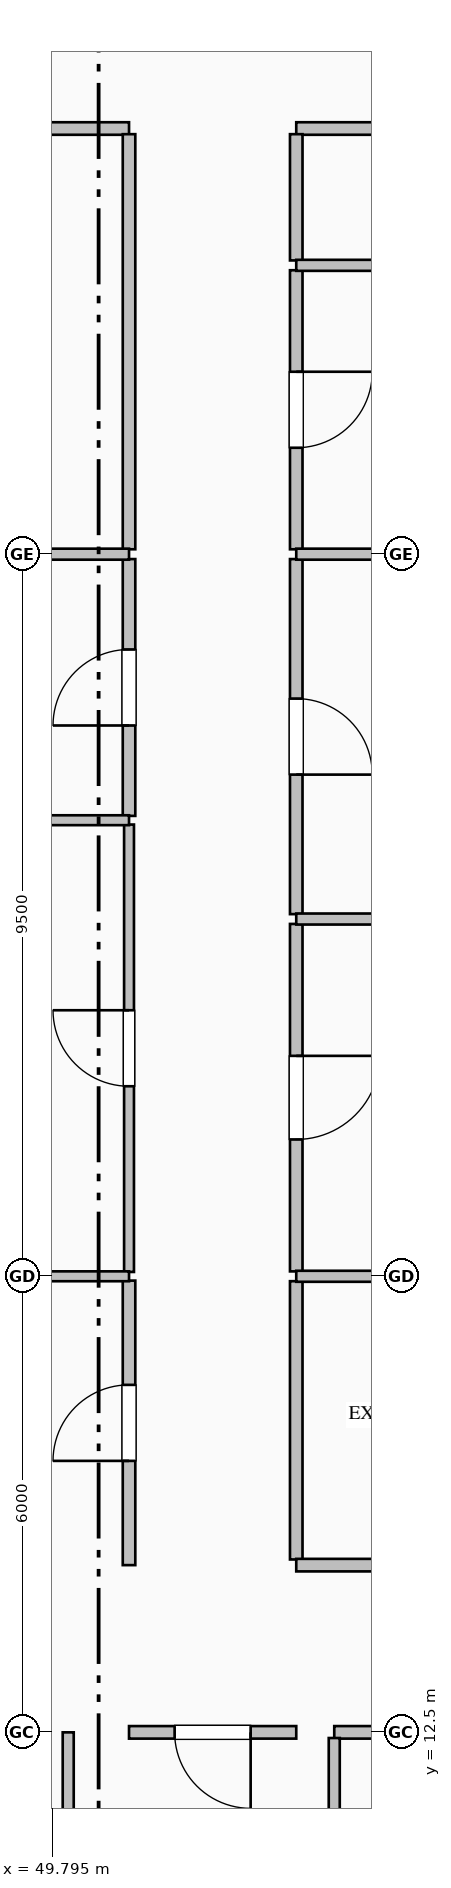
"""IFC4 building model, lengths in metres.
Left out: names, types, materials, properties, quantities, classifications, styles, units other than length and angle.
Written with IfcOpenShell. Run it as: python <this file> out.ifc"""

import sys

from ifc_helpers import new_model, si_unit, direction, frame, frame_2d, origin, place, context, subcontext, project, spatial, rectangle, extrude, element, fill, save


model = new_model("IFC4")
c1 = context("Model", 3, precision=1e-05, world=origin(), true_north=direction((0.0, 1.0)))
c2 = subcontext(c1, "Body", "Model", "MODEL_VIEW")
j1 = project(units=[si_unit("LENGTHUNIT", "METRE"), si_unit("PLANEANGLEUNIT", "RADIAN")], contexts=[c1])
p1 = place(None, origin())
s1 = spatial("IfcSite", under=j1, at=p1, CompositionType="ELEMENT")
p2 = place(p1, origin())
s2 = spatial("IfcBuilding", under=s1, at=p2, CompositionType="ELEMENT")
p3 = place(p2, frame((0.0, 0.0, 127.0)))
s3 = spatial("IfcBuildingStorey", under=s2, at=p3, CompositionType="ELEMENT", Elevation=127.0)
p4 = place(p3, frame((56.5, 33.6, 0.0), z_axis=(0.0, 0.0, 1.0), x_axis=(-1.0, 0.0, 0.0)))
e1 = element("IfcWall", 1, at=p4, inside=s3, PredefinedType="PARTITIONING", context=c2, shape_type="SweptSolid", body=[
    extrude(rectangle(XDim=3.5, YDim=0.165, at=frame_2d((1.75, 0.0))), origin(), (0.0, 0.0, 1.0), 3.765),
])
p5 = place(p4, frame((1.2, 0.0, 0.0)))
e2 = element("IfcOpeningElement", 2, at=p5, cuts=e1, PredefinedType="OPENING", context=c2, shape_type="SweptSolid", body=[
    extrude(rectangle(XDim=1.1, YDim=2.2, at=frame_2d((0.55, 1.1))), frame((0.0, 0.093, 0.0), z_axis=(0.0, -1.0, 0.0), x_axis=(1.0, 0.0, 0.0)), (0.0, 0.0, 1.0), 0.185),
])
p6 = place(p3, frame((50.8, 33.6, 0.0), z_axis=(0.0, 0.0, 1.0), x_axis=(-1.0, 0.0, 0.0)))
e3 = element("IfcWall", 3, at=p6, inside=s3, PredefinedType="PARTITIONING", context=c2, shape_type="SweptSolid", body=[
    extrude(rectangle(XDim=10.3, YDim=0.165, at=frame_2d((5.15, 0.0))), origin(), (0.0, 0.0, 1.0), 3.765),
])
p7 = place(p6, frame((4.65, 0.0, 0.0)))
e4 = element("IfcOpeningElement", 4, at=p7, cuts=e3, PredefinedType="OPENING", context=c2, shape_type="SweptSolid", body=[
    extrude(rectangle(XDim=1.0, YDim=2.15, at=frame_2d((0.5, 1.075))), frame((0.0, 0.093, 0.0), z_axis=(0.0, -1.0, 0.0), x_axis=(1.0, 0.0, 0.0)), (0.0, 0.0, 1.0), 0.185),
])
p8 = place(p3, frame((53.0, 18.436, 0.0), z_axis=(0.0, 0.0, 1.0), x_axis=(0.0, -1.0, 0.0)))
e5 = element("IfcWall", 5, at=p8, inside=s3, PredefinedType="PARTITIONING", context=c2, shape_type="SweptSolid", body=[
    extrude(rectangle(XDim=3.661, YDim=0.165, at=frame_2d((1.831, 0.0))), origin(), (0.0, 0.0, 1.0), 3.765),
])
p9 = place(p3, frame((53.0, 23.135, 0.0), z_axis=(0.0, 0.0, 1.0), x_axis=(0.0, -1.0, 0.0)))
e6 = element("IfcWall", 6, at=p9, inside=s3, PredefinedType="PARTITIONING", context=c2, shape_type="SweptSolid", body=[
    extrude(rectangle(XDim=4.571, YDim=0.165, at=frame_2d((2.286, 0.0))), origin(), (0.0, 0.0, 1.0), 3.765),
])
p10 = place(p9, frame((1.736, 0.0, 0.0)))
e7 = element("IfcOpeningElement", 7, at=p10, cuts=e6, PredefinedType="OPENING", context=c2, shape_type="SweptSolid", body=[
    extrude(rectangle(XDim=1.1, YDim=2.2, at=frame_2d((0.55, 1.1))), frame((0.0, 0.093, 0.0), z_axis=(0.0, -1.0, 0.0), x_axis=(1.0, 0.0, 0.0)), (0.0, 0.0, 1.0), 0.185),
])
p11 = place(p3, frame((53.0, 27.936, 0.0), z_axis=(0.0, 0.0, 1.0), x_axis=(0.0, -1.0, 0.0)))
e8 = element("IfcWall", 8, at=p11, inside=s3, PredefinedType="PARTITIONING", context=c2, shape_type="SweptSolid", body=[
    extrude(rectangle(XDim=4.671, YDim=0.165, at=frame_2d((2.335, 0.0))), origin(), (0.0, 0.0, 1.0), 3.765),
])
p12 = place(p11, frame((1.835, 0.0, 0.0)))
e9 = element("IfcOpeningElement", 9, at=p12, cuts=e8, PredefinedType="OPENING", context=c2, shape_type="SweptSolid", body=[
    extrude(rectangle(XDim=1.0, YDim=2.15, at=frame_2d((0.5, 1.075))), frame((0.0, 0.093, 0.0), z_axis=(0.0, -1.0, 0.0), x_axis=(1.0, 0.0, 0.0)), (0.0, 0.0, 1.0), 0.185),
])
p13 = place(p3, frame((53.0, 31.736, 0.0), z_axis=(0.0, 0.0, 1.0), x_axis=(0.0, -1.0, 0.0)))
e10 = element("IfcWall", 10, at=p13, inside=s3, PredefinedType="PARTITIONING", context=c2, shape_type="SweptSolid", body=[
    extrude(rectangle(XDim=3.671, YDim=0.165, at=frame_2d((1.835, 0.0))), origin(), (0.0, 0.0, 1.0), 3.765),
])
p14 = place(p13, frame((1.335, 0.0, 0.0)))
e11 = element("IfcOpeningElement", 11, at=p14, cuts=e10, PredefinedType="OPENING", context=c2, shape_type="SweptSolid", body=[
    extrude(rectangle(XDim=1.0, YDim=2.15, at=frame_2d((0.5, 1.075))), frame((0.0, 0.093, 0.0), z_axis=(0.0, -1.0, 0.0), x_axis=(1.0, 0.0, 0.0)), (0.0, 0.0, 1.0), 0.185),
])
p15 = place(p3, frame((53.0, 33.525, 0.0), z_axis=(0.0, 0.0, 1.0), x_axis=(0.0, -1.0, 0.0)))
e12 = element("IfcWall", 12, at=p15, inside=s3, PredefinedType="PARTITIONING", context=c2, shape_type="SweptSolid", body=[
    extrude(rectangle(XDim=1.661, YDim=0.165, at=frame_2d((0.831, 0.0))), origin(), (0.0, 0.0, 1.0), 3.765),
])
p16 = place(p3, frame((50.8, 14.7, 0.0), z_axis=(0.0, 0.0, 1.0), x_axis=(0.0, 1.0, 0.0)))
e13 = element("IfcWall", 13, at=p16, inside=s3, PredefinedType="PARTITIONING", context=c2, shape_type="SweptSolid", body=[
    extrude(rectangle(XDim=3.743, YDim=0.165, at=frame_2d((1.872, 0.0))), origin(), (0.0, 0.0, 1.0), 3.765),
])
p17 = place(p16, frame((1.372, 0.0, 0.0)))
e14 = element("IfcOpeningElement", 14, at=p17, cuts=e13, PredefinedType="OPENING", context=c2, shape_type="SweptSolid", body=[
    extrude(rectangle(XDim=1.0, YDim=2.15, at=frame_2d((0.5, 1.075))), frame((0.0, 0.093, 0.0), z_axis=(0.0, -1.0, 0.0), x_axis=(1.0, 0.0, 0.0)), (0.0, 0.0, 1.0), 0.185),
])
p18 = place(p3, frame((50.8, 18.557, 0.0), z_axis=(0.0, 0.0, 1.0), x_axis=(0.0, 1.0, 0.0)))
e15 = element("IfcWall", 15, at=p18, inside=s3, PredefinedType="PARTITIONING", context=c2, shape_type="SweptSolid", body=[
    extrude(rectangle(XDim=5.886, YDim=0.13, at=frame_2d((2.943, 0.0))), origin(), (0.0, 0.0, 1.0), 3.765),
])
p19 = place(p18, frame((2.443, 0.0, 0.0)))
e16 = element("IfcOpeningElement", 16, at=p19, cuts=e15, PredefinedType="OPENING", context=c2, shape_type="SweptSolid", body=[
    extrude(rectangle(XDim=1.0, YDim=2.15, at=frame_2d((0.5, 1.075))), frame((0.0, 0.075, 0.0), z_axis=(0.0, -1.0, 0.0), x_axis=(1.0, 0.0, 0.0)), (0.0, 0.0, 1.0), 0.15),
])
p20 = place(p3, frame((50.8, 24.557, 0.0), z_axis=(0.0, 0.0, 1.0), x_axis=(0.0, 1.0, 0.0)))
e17 = element("IfcWall", 17, at=p20, inside=s3, PredefinedType="PARTITIONING", context=c2, shape_type="SweptSolid", body=[
    extrude(rectangle(XDim=3.379, YDim=0.165, at=frame_2d((1.689, 0.0))), origin(), (0.0, 0.0, 1.0), 3.765),
])
p21 = place(p20, frame((1.189, 0.0, 0.0)))
e18 = element("IfcOpeningElement", 18, at=p21, cuts=e17, PredefinedType="OPENING", context=c2, shape_type="SweptSolid", body=[
    extrude(rectangle(XDim=1.0, YDim=2.15, at=frame_2d((0.5, 1.075))), frame((0.0, 0.093, 0.0), z_axis=(0.0, -1.0, 0.0), x_axis=(1.0, 0.0, 0.0)), (0.0, 0.0, 1.0), 0.185),
])
p22 = place(p3, frame((50.8, 28.064, 0.0), z_axis=(0.0, 0.0, 1.0), x_axis=(0.0, 1.0, 0.0)))
e19 = element("IfcWall", 19, at=p22, inside=s3, PredefinedType="PARTITIONING", context=c2, shape_type="SweptSolid", body=[
    extrude(rectangle(XDim=5.461, YDim=0.165, at=frame_2d((2.73, 0.0))), origin(), (0.0, 0.0, 1.0), 3.765),
])
p23 = place(p3, frame((53.0, 12.5, 0.0), z_axis=(0.0, 0.0, 1.0), x_axis=(-1.0, 0.0, 0.0)))
e20 = element("IfcWall", 20, at=p23, inside=s3, PredefinedType="PARTITIONING", context=c2, shape_type="SweptSolid", body=[
    extrude(rectangle(XDim=2.2, YDim=0.165, at=frame_2d((1.1, 0.0))), origin(), (0.0, 0.0, 1.0), 3.157),
])
p24 = place(p23, frame((0.6, 0.0, 0.0)))
e21 = element("IfcOpeningElement", 21, at=p24, cuts=e20, PredefinedType="OPENING", context=c2, shape_type="SweptSolid", body=[
    extrude(rectangle(XDim=1.0, YDim=2.15, at=frame_2d((0.5, 1.075))), frame((0.0, 0.093, 0.0), z_axis=(0.0, -1.0, 0.0), x_axis=(1.0, 0.0, 0.0)), (0.0, 0.0, 1.0), 0.185),
])
p25 = place(p3, frame((53.0, 14.7, 0.0), z_axis=(0.0, 0.0, 1.0), x_axis=(1.0, 0.0, 0.0)))
e22 = element("IfcWall", 22, at=p25, inside=s3, PredefinedType="PARTITIONING", context=c2, shape_type="SweptSolid", body=[
    extrude(rectangle(XDim=8.5, YDim=0.165, at=frame_2d((4.25, 0.0))), origin(), (0.0, 0.0, 1.0), 3.765),
])
p26 = place(p25, frame((3.75, 0.0, 0.0)))
e23 = element("IfcOpeningElement", 23, at=p26, cuts=e22, PredefinedType="OPENING", context=c2, shape_type="SweptSolid", body=[
    extrude(rectangle(XDim=1.0, YDim=2.15, at=frame_2d((0.5, 1.075))), frame((0.0, 0.093, 0.0), z_axis=(0.0, -1.0, 0.0), x_axis=(1.0, 0.0, 0.0)), (0.0, 0.0, 1.0), 0.185),
])
p27 = place(p3, frame((57.0, 12.5, 0.0), z_axis=(0.0, 0.0, 1.0), x_axis=(-1.0, 0.0, 0.0)))
e24 = element("IfcWall", 24, at=p27, inside=s3, PredefinedType="PARTITIONING", context=c2, shape_type="SweptSolid", body=[
    extrude(rectangle(XDim=3.5, YDim=0.165, at=frame_2d((1.75, 0.0))), origin(), (0.0, 0.0, 1.0), 3.157),
])
p28 = place(p27, frame((1.2, 0.0, 0.0)))
e25 = element("IfcOpeningElement", 25, at=p28, cuts=e24, PredefinedType="OPENING", context=c2, shape_type="SweptSolid", body=[
    extrude(rectangle(XDim=1.1, YDim=2.2, at=frame_2d((0.55, 1.1))), frame((0.0, 0.093, 0.0), z_axis=(0.0, -1.0, 0.0), x_axis=(1.0, 0.0, 0.0)), (0.0, 0.0, 1.0), 0.185),
])
p29 = place(p3, frame((53.0, 18.5, 0.0), z_axis=(0.0, 0.0, 1.0), x_axis=(1.0, 0.0, 0.0)))
e26 = element("IfcWall", 26, at=p29, inside=s3, PredefinedType="PARTITIONING", context=c2, shape_type="SweptSolid", body=[
    extrude(rectangle(XDim=10.728, YDim=0.145, at=frame_2d((5.364, 0.0))), origin(), (0.0, 0.0, 1.0), 3.157),
])
p30 = place(p3, frame((53.0, 23.2, 0.0), z_axis=(0.0, 0.0, 1.0), x_axis=(1.0, 0.0, 0.0)))
e27 = element("IfcWall", 27, at=p30, inside=s3, PredefinedType="PARTITIONING", context=c2, shape_type="SweptSolid", body=[
    extrude(rectangle(XDim=10.728, YDim=0.145, at=frame_2d((5.364, 0.0))), origin(), (0.0, 0.0, 1.0), 3.407),
])
p31 = place(p3, frame((53.0, 28.0, 0.0), z_axis=(0.0, 0.0, 1.0), x_axis=(1.0, 0.0, 0.0)))
e28 = element("IfcWall", 28, at=p31, inside=s3, PredefinedType="PARTITIONING", context=c2, shape_type="SweptSolid", body=[
    extrude(rectangle(XDim=10.728, YDim=0.145, at=frame_2d((5.364, 0.0))), origin(), (0.0, 0.0, 1.0), 3.157),
])
p32 = place(p3, frame((53.0, 31.8, 0.0), z_axis=(0.0, 0.0, 1.0), x_axis=(1.0, 0.0, 0.0)))
e29 = element("IfcWall", 29, at=p32, inside=s3, PredefinedType="PARTITIONING", context=c2, shape_type="SweptSolid", body=[
    extrude(rectangle(XDim=10.728, YDim=0.145, at=frame_2d((5.364, 0.0))), origin(), (0.0, 0.0, 1.0), 3.765),
])
p33 = place(p3, frame((40.832, 18.5, 0.0), z_axis=(0.0, 0.0, 1.0), x_axis=(1.0, 0.0, 0.0)))
e30 = element("IfcWall", 30, at=p33, inside=s3, PredefinedType="PARTITIONING", context=c2, shape_type="SweptSolid", body=[
    extrude(rectangle(XDim=9.968, YDim=0.13, at=frame_2d((4.984, 0.0))), origin(), (0.0, 0.0, 1.0), 3.157),
])
p34 = place(p3, frame((40.832, 24.5, 0.0), z_axis=(0.0, 0.0, 1.0), x_axis=(1.0, 0.0, 0.0)))
e31 = element("IfcWall", 31, at=p34, inside=s3, PredefinedType="PARTITIONING", context=c2, shape_type="SweptSolid", body=[
    extrude(rectangle(XDim=9.968, YDim=0.13, at=frame_2d((4.984, 0.0))), origin(), (0.0, 0.0, 1.0), 3.765),
])
p35 = place(p3, frame((40.832, 28.0, 0.0), z_axis=(0.0, 0.0, 1.0), x_axis=(1.0, 0.0, 0.0)))
e32 = element("IfcWall", 32, at=p35, inside=s3, PredefinedType="PARTITIONING", context=c2, shape_type="SweptSolid", body=[
    extrude(rectangle(XDim=9.968, YDim=0.145, at=frame_2d((4.984, 0.0))), origin(), (0.0, 0.0, 1.0), 3.157),
])
p36 = place(p3, frame((50.0, 12.5, 0.0), z_axis=(0.0, 0.0, 1.0), x_axis=(0.0, -1.0, 0.0)))
e33 = element("IfcWall", 33, at=p36, inside=s3, PredefinedType="PARTITIONING", context=c2, shape_type="SweptSolid", body=[
    extrude(rectangle(XDim=8.168, YDim=0.145, at=frame_2d((4.084, 0.0))), origin(), (0.0, 0.0, 1.0), 3.765),
])
p37 = place(p36, frame((3.534, 0.0, 0.0)))
e34 = element("IfcOpeningElement", 34, at=p37, cuts=e33, PredefinedType="OPENING", context=c2, shape_type="SweptSolid", body=[
    extrude(rectangle(XDim=1.1, YDim=2.2, at=frame_2d((0.55, 1.1))), frame((0.0, 0.083, 0.0), z_axis=(0.0, -1.0, 0.0), x_axis=(1.0, 0.0, 0.0)), (0.0, 0.0, 1.0), 0.165),
])
p38 = place(p3, frame((53.5, 12.426, 0.0), z_axis=(0.0, 0.0, 1.0), x_axis=(0.0, -1.0, 0.0)))
e35 = element("IfcWall", 35, at=p38, inside=s3, PredefinedType="PARTITIONING", context=c2, shape_type="SweptSolid", body=[
    extrude(rectangle(XDim=8.094, YDim=0.145, at=frame_2d((4.047, 0.0))), origin(), (0.0, 0.0, 1.0), 3.765),
])
p39 = place(p10, origin())
e36 = element("IfcDoor", 36, at=p39, inside=s3, OperationType="SINGLE_SWING_LEFT", PredefinedType="DOOR", context=c2, shape_type="SweptSolid", body=[
    extrude(rectangle(XDim=1.1, YDim=2.2, at=frame_2d((0.55, 1.1))), frame((0.0, 0.025, 0.0), z_axis=(0.0, -1.0, 0.0), x_axis=(1.0, 0.0, 0.0)), (0.0, 0.0, 1.0), 0.05),
])
fill(e7, e36)
p40 = place(p12, origin())
e37 = element("IfcDoor", 37, at=p40, inside=s3, OperationType="SINGLE_SWING_RIGHT", PredefinedType="DOOR", context=c2, shape_type="SweptSolid", body=[
    extrude(rectangle(XDim=1.0, YDim=2.15, at=frame_2d((0.5, 1.075))), frame((0.0, 0.025, 0.0), z_axis=(0.0, -1.0, 0.0), x_axis=(1.0, 0.0, 0.0)), (0.0, 0.0, 1.0), 0.05),
])
fill(e9, e37)
p41 = place(p14, origin())
e38 = element("IfcDoor", 38, at=p41, inside=s3, OperationType="SINGLE_SWING_LEFT", PredefinedType="DOOR", context=c2, shape_type="SweptSolid", body=[
    extrude(rectangle(XDim=1.0, YDim=2.15, at=frame_2d((0.5, 1.075))), frame((0.0, 0.025, 0.0), z_axis=(0.0, -1.0, 0.0), x_axis=(1.0, 0.0, 0.0)), (0.0, 0.0, 1.0), 0.05),
])
fill(e11, e38)
p42 = place(p17, origin())
e39 = element("IfcDoor", 39, at=p42, inside=s3, OperationType="SINGLE_SWING_LEFT", PredefinedType="DOOR", context=c2, shape_type="SweptSolid", body=[
    extrude(rectangle(XDim=1.0, YDim=2.15, at=frame_2d((0.5, 1.075))), frame((0.0, 0.025, 0.0), z_axis=(0.0, -1.0, 0.0), x_axis=(1.0, 0.0, 0.0)), (0.0, 0.0, 1.0), 0.05),
])
fill(e14, e39)
p43 = place(p19, origin())
e40 = element("IfcDoor", 40, at=p43, inside=s3, OperationType="SINGLE_SWING_RIGHT", PredefinedType="DOOR", context=c2, shape_type="SweptSolid", body=[
    extrude(rectangle(XDim=1.0, YDim=2.15, at=frame_2d((0.5, 1.075))), frame((0.0, 0.025, 0.0), z_axis=(0.0, -1.0, 0.0), x_axis=(1.0, 0.0, 0.0)), (0.0, 0.0, 1.0), 0.05),
])
fill(e16, e40)
p44 = place(p21, origin())
e41 = element("IfcDoor", 41, at=p44, inside=s3, OperationType="SINGLE_SWING_LEFT", PredefinedType="DOOR", context=c2, shape_type="SweptSolid", body=[
    extrude(rectangle(XDim=1.0, YDim=2.15, at=frame_2d((0.5, 1.075))), frame((0.0, 0.025, 0.0), z_axis=(0.0, -1.0, 0.0), x_axis=(1.0, 0.0, 0.0)), (0.0, 0.0, 1.0), 0.05),
])
fill(e18, e41)
p45 = place(p24, origin())
e42 = element("IfcDoor", 42, at=p45, inside=s3, OperationType="SINGLE_SWING_LEFT", PredefinedType="DOOR", context=c2, shape_type="SweptSolid", body=[
    extrude(rectangle(XDim=1.0, YDim=2.15, at=frame_2d((0.5, 1.075))), frame((0.0, 0.025, 0.0), z_axis=(0.0, -1.0, 0.0), x_axis=(1.0, 0.0, 0.0)), (0.0, 0.0, 1.0), 0.05),
])
fill(e21, e42)
save(model, sys.argv[1])
